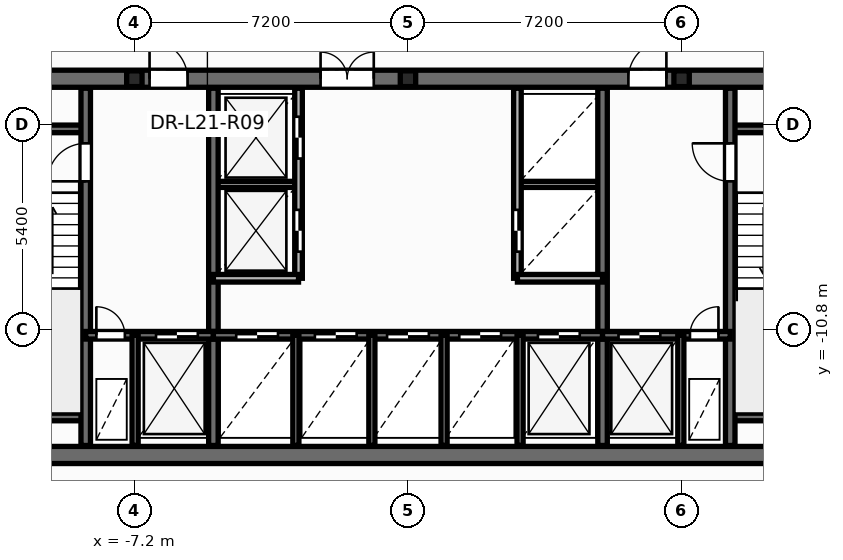
"""IFC4 building model, lengths in metres.
Left out: names, types, materials, properties, quantities, classifications, styles, units other than length and angle.
Written with IfcOpenShell. Run it as: python <this file> out.ifc"""

import sys

from ifc_helpers import new_model, si_unit, direction, frame, frame_2d, origin, origin_2d, place, context, subcontext, project, spatial, rectangle, i_section, extrude, element, fill, save


model = new_model("IFC4")
c1 = context("Model", 3, precision=1e-05, world=origin(), true_north=direction((0.0, 1.0)))
c2 = subcontext(c1, "Body", "Model", "MODEL_VIEW")
j1 = project(units=[si_unit("LENGTHUNIT", "METRE"), si_unit("PLANEANGLEUNIT", "RADIAN")], contexts=[c1])
p1 = place(None, origin())
s1 = spatial("IfcSite", under=j1, at=p1, CompositionType="ELEMENT")
p2 = place(p1, origin())
s2 = spatial("IfcBuilding", under=s1, at=p2, CompositionType="ELEMENT")
p3 = place(p2, frame((0.0, 0.0, 82.8)))
s3 = spatial("IfcBuildingStorey", under=s2, at=p3, CompositionType="ELEMENT", Elevation=82.8)
for number, where, z_axis, x_axis in (
    (1, (-7.2, -4.2, 0.0), (0.0, 0.0, 1.0), (1.0, 0.0, 0.0)),
    (2, (0.0, -4.2, 0.0), (0.0, 0.0, 1.0), (1.0, 0.0, 0.0)),
    (3, (7.2, -4.2, 0.0), (0.0, 0.0, 1.0), (1.0, 0.0, 0.0)),
):
    element("IfcColumn", number, at=place(p3, frame(where, z_axis=z_axis, x_axis=x_axis)), inside=s3, PredefinedType="PILASTER", context=c2, shape_type="SweptSolid", body=[
        extrude(i_section(OverallWidth=0.405, OverallDepth=0.414, WebThickness=0.022, FlangeThickness=0.032, at=origin_2d()), origin(), (0.0, 0.0, 1.0), 3.6),
    ])
for number, where, z_axis, x_axis in (
    (4, (-5.12, -6.98, 0.0), (0.0, 0.0, 1.0), (1.0, 0.0, 0.0)),
    (5, (2.88, -6.98, 0.0), (0.0, 0.0, 1.0), (1.0, 0.0, 0.0)),
):
    element("IfcWall", number, at=place(p3, frame(where, z_axis=z_axis, x_axis=x_axis)), inside=s3, PredefinedType="PARTITIONING", context=c2, shape_type="SweptSolid", body=[
        extrude(rectangle(XDim=2.24, YDim=0.16, at=frame_2d((1.12, 0.0))), origin(), (0.0, 0.0, 1.0), 3.35),
    ])
p4 = place(p3, frame((-12.65, -14.1, 0.0), z_axis=(0.0, 0.0, 1.0), x_axis=(1.0, 0.0, 0.0)))
e6 = element("IfcWall", 6, at=p4, inside=s3, PredefinedType="SHEAR", context=c2, shape_type="SweptSolid", body=[
    extrude(rectangle(XDim=25.3, YDim=0.45, at=frame_2d((12.65, 0.0))), origin(), (0.0, 0.0, 1.0), 3.6),
])
p5 = place(p3, frame((-12.65, -4.2, 0.0), z_axis=(0.0, 0.0, 1.0), x_axis=(1.0, 0.0, 0.0)))
e7 = element("IfcWall", 7, at=p5, inside=s3, PredefinedType="SHEAR", context=c2, shape_type="SweptSolid", body=[
    extrude(rectangle(XDim=25.3, YDim=0.45, at=frame_2d((12.65, 0.0))), origin(), (0.0, 0.0, 1.0), 3.6),
])
p6 = place(p5, frame((1.85, 0.0, 0.0)))
e8 = element("IfcOpeningElement", 8, at=p6, cuts=e7, PredefinedType="OPENING", context=c2, shape_type="SweptSolid", body=[
    extrude(rectangle(XDim=0.756, YDim=2.054, at=frame_2d((0.375, 1.027))), frame((0.0, 0.235, 0.0), z_axis=(0.0, -1.0, 0.0), x_axis=(1.0, 0.0, 0.0)), (0.0, 0.0, 1.0), 0.47),
])
p7 = place(p5, frame((22.65, 0.0, 0.0)))
e9 = element("IfcOpeningElement", 9, at=p7, cuts=e7, PredefinedType="OPENING", context=c2, shape_type="SweptSolid", body=[
    extrude(rectangle(XDim=0.756, YDim=2.054, at=frame_2d((0.375, 1.027))), frame((0.0, 0.235, 0.0), z_axis=(0.0, -1.0, 0.0), x_axis=(1.0, 0.0, 0.0)), (0.0, 0.0, 1.0), 0.47),
])
p8 = place(p5, frame((5.85, 0.0, 0.0)))
e10 = element("IfcOpeningElement", 10, at=p8, cuts=e7, PredefinedType="OPENING", context=c2, shape_type="SweptSolid", body=[
    extrude(rectangle(XDim=1.006, YDim=2.104, at=frame_2d((0.5, 1.052))), frame((0.0, 0.235, 0.0), z_axis=(0.0, -1.0, 0.0), x_axis=(1.0, 0.0, 0.0)), (0.0, 0.0, 1.0), 0.47),
])
p9 = place(p5, frame((10.35, 0.0, 0.0)))
e11 = element("IfcOpeningElement", 11, at=p9, cuts=e7, PredefinedType="OPENING", context=c2, shape_type="SweptSolid", body=[
    extrude(rectangle(XDim=1.406, YDim=2.154, at=frame_2d((0.7, 1.077))), frame((0.0, 0.235, 0.0), z_axis=(0.0, -1.0, 0.0), x_axis=(1.0, 0.0, 0.0)), (0.0, 0.0, 1.0), 0.47),
])
p10 = place(p5, frame((18.45, 0.0, 0.0)))
e12 = element("IfcOpeningElement", 12, at=p10, cuts=e7, PredefinedType="OPENING", context=c2, shape_type="SweptSolid", body=[
    extrude(rectangle(XDim=1.006, YDim=2.104, at=frame_2d((0.5, 1.052))), frame((0.0, 0.235, 0.0), z_axis=(0.0, -1.0, 0.0), x_axis=(1.0, 0.0, 0.0)), (0.0, 0.0, 1.0), 0.47),
])
for number, where, z_axis, x_axis in (
    (13, (-12.35, -5.52, 0.0), (0.0, 0.0, 1.0), (1.0, 0.0, 0.0)),
    (14, (-12.35, -13.1, 0.0), (0.0, 0.0, 1.0), (1.0, 0.0, 0.0)),
    (15, (8.48, -5.52, 0.0), (0.0, 0.0, 1.0), (1.0, 0.0, 0.0)),
    (16, (8.48, -13.1, 0.0), (0.0, 0.0, 1.0), (1.0, 0.0, 0.0)),
):
    element("IfcWall", number, at=place(p3, frame(where, z_axis=z_axis, x_axis=x_axis)), inside=s3, PredefinedType="SOLIDWALL", context=c2, shape_type="SweptSolid", body=[
        extrude(rectangle(XDim=3.87, YDim=0.2, at=frame_2d((1.935, 0.0))), origin(), (0.0, 0.0, 1.0), 3.6),
    ])
p11 = place(p3, frame((-8.48, -13.85, 0.0), z_axis=(0.0, 0.0, 1.0), x_axis=(0.0, 1.0, 0.0)))
e17 = element("IfcWall", 17, at=p11, inside=s3, PredefinedType="SHEAR", context=c2, shape_type="SweptSolid", body=[
    extrude(rectangle(XDim=9.4, YDim=0.25, at=frame_2d((4.7, 0.0))), origin(), (0.0, 0.0, 1.0), 3.6),
])
p12 = place(p11, frame((6.95, 0.0, 0.0)))
e18 = element("IfcOpeningElement", 18, at=p12, cuts=e17, PredefinedType="OPENING", context=c2, shape_type="SweptSolid", body=[
    extrude(rectangle(XDim=1.006, YDim=2.104, at=frame_2d((0.5, 1.052))), frame((0.0, 0.135, 0.0), z_axis=(0.0, -1.0, 0.0), x_axis=(1.0, 0.0, 0.0)), (0.0, 0.0, 1.0), 0.27),
])
p13 = place(p3, frame((8.48, -13.85, 0.0), z_axis=(0.0, 0.0, 1.0), x_axis=(0.0, 1.0, 0.0)))
e19 = element("IfcWall", 19, at=p13, inside=s3, PredefinedType="SHEAR", context=c2, shape_type="SweptSolid", body=[
    extrude(rectangle(XDim=9.4, YDim=0.25, at=frame_2d((4.7, 0.0))), origin(), (0.0, 0.0, 1.0), 3.6),
])
p14 = place(p13, frame((6.95, 0.0, 0.0)))
e20 = element("IfcOpeningElement", 20, at=p14, cuts=e19, PredefinedType="OPENING", context=c2, shape_type="SweptSolid", body=[
    extrude(rectangle(XDim=1.006, YDim=2.104, at=frame_2d((0.5, 1.052))), frame((0.0, 0.135, 0.0), z_axis=(0.0, -1.0, 0.0), x_axis=(1.0, 0.0, 0.0)), (0.0, 0.0, 1.0), 0.27),
])
for number, where, z_axis, x_axis in (
    (21, (-5.12, -13.85, 0.0), (0.0, 0.0, 1.0), (0.0, 1.0, 0.0)),
    (22, (5.12, -13.85, 0.0), (0.0, 0.0, 1.0), (0.0, 1.0, 0.0)),
):
    element("IfcWall", number, at=place(p3, frame(where, z_axis=z_axis, x_axis=x_axis)), inside=s3, PredefinedType="SHEAR", context=c2, shape_type="SweptSolid", body=[
        extrude(rectangle(XDim=9.4, YDim=0.25, at=frame_2d((4.7, 0.0))), origin(), (0.0, 0.0, 1.0), 3.6),
    ])
p15 = place(p3, frame((-8.48, -10.95, 0.0), z_axis=(0.0, 0.0, 1.0), x_axis=(1.0, 0.0, 0.0)))
e23 = element("IfcWall", 23, at=p15, inside=s3, PredefinedType="SOLIDWALL", context=c2, shape_type="SweptSolid", body=[
    extrude(rectangle(XDim=3.36, YDim=0.2, at=frame_2d((1.68, 0.0))), origin(), (0.0, 0.0, 1.0), 3.6),
])
p16 = place(p15, frame((0.28, 0.0, 0.0)))
e24 = element("IfcOpeningElement", 24, at=p16, cuts=e23, PredefinedType="OPENING", context=c2, shape_type="SweptSolid", body=[
    extrude(rectangle(XDim=0.756, YDim=2.054, at=frame_2d((0.375, 1.027))), frame((0.0, 0.11, 0.0), z_axis=(0.0, -1.0, 0.0), x_axis=(1.0, 0.0, 0.0)), (0.0, 0.0, 1.0), 0.22),
])
p17 = place(p15, frame((1.85, 0.0, 0.0)))
e25 = element("IfcOpeningElement", 25, at=p17, cuts=e23, PredefinedType="OPENING", context=c2, shape_type="SweptSolid", body=[
    extrude(rectangle(XDim=1.106, YDim=2.104, at=frame_2d((0.55, 1.052))), frame((0.0, 0.11, 0.0), z_axis=(0.0, -1.0, 0.0), x_axis=(1.0, 0.0, 0.0)), (0.0, 0.0, 1.0), 0.22),
])
p18 = place(p3, frame((-5.12, -10.95, 0.0), z_axis=(0.0, 0.0, 1.0), x_axis=(1.0, 0.0, 0.0)))
e26 = element("IfcWall", 26, at=p18, inside=s3, PredefinedType="SOLIDWALL", context=c2, shape_type="SweptSolid", body=[
    extrude(rectangle(XDim=10.24, YDim=0.2, at=frame_2d((5.12, 0.0))), origin(), (0.0, 0.0, 1.0), 3.6),
])
p19 = place(p18, frame((0.6, 0.0, 0.0)))
e27 = element("IfcOpeningElement", 27, at=p19, cuts=e26, PredefinedType="OPENING", context=c2, shape_type="SweptSolid", body=[
    extrude(rectangle(XDim=1.106, YDim=2.104, at=frame_2d((0.55, 1.052))), frame((0.0, 0.11, 0.0), z_axis=(0.0, -1.0, 0.0), x_axis=(1.0, 0.0, 0.0)), (0.0, 0.0, 1.0), 0.22),
])
p20 = place(p18, frame((2.67, 0.0, 0.0)))
e28 = element("IfcOpeningElement", 28, at=p20, cuts=e26, PredefinedType="OPENING", context=c2, shape_type="SweptSolid", body=[
    extrude(rectangle(XDim=1.106, YDim=2.104, at=frame_2d((0.55, 1.052))), frame((0.0, 0.11, 0.0), z_axis=(0.0, -1.0, 0.0), x_axis=(1.0, 0.0, 0.0)), (0.0, 0.0, 1.0), 0.22),
])
p21 = place(p18, frame((4.57, 0.0, 0.0)))
e29 = element("IfcOpeningElement", 29, at=p21, cuts=e26, PredefinedType="OPENING", context=c2, shape_type="SweptSolid", body=[
    extrude(rectangle(XDim=1.106, YDim=2.104, at=frame_2d((0.55, 1.052))), frame((0.0, 0.11, 0.0), z_axis=(0.0, -1.0, 0.0), x_axis=(1.0, 0.0, 0.0)), (0.0, 0.0, 1.0), 0.22),
])
p22 = place(p18, frame((6.47, 0.0, 0.0)))
e30 = element("IfcOpeningElement", 30, at=p22, cuts=e26, PredefinedType="OPENING", context=c2, shape_type="SweptSolid", body=[
    extrude(rectangle(XDim=1.106, YDim=2.104, at=frame_2d((0.55, 1.052))), frame((0.0, 0.11, 0.0), z_axis=(0.0, -1.0, 0.0), x_axis=(1.0, 0.0, 0.0)), (0.0, 0.0, 1.0), 0.22),
])
p23 = place(p18, frame((8.54, 0.0, 0.0)))
e31 = element("IfcOpeningElement", 31, at=p23, cuts=e26, PredefinedType="OPENING", context=c2, shape_type="SweptSolid", body=[
    extrude(rectangle(XDim=1.106, YDim=2.104, at=frame_2d((0.55, 1.052))), frame((0.0, 0.11, 0.0), z_axis=(0.0, -1.0, 0.0), x_axis=(1.0, 0.0, 0.0)), (0.0, 0.0, 1.0), 0.22),
])
p24 = place(p3, frame((5.12, -10.95, 0.0), z_axis=(0.0, 0.0, 1.0), x_axis=(1.0, 0.0, 0.0)))
e32 = element("IfcWall", 32, at=p24, inside=s3, PredefinedType="SOLIDWALL", context=c2, shape_type="SweptSolid", body=[
    extrude(rectangle(XDim=3.36, YDim=0.2, at=frame_2d((1.68, 0.0))), origin(), (0.0, 0.0, 1.0), 3.6),
])
p25 = place(p24, frame((0.42, 0.0, 0.0)))
e33 = element("IfcOpeningElement", 33, at=p25, cuts=e32, PredefinedType="OPENING", context=c2, shape_type="SweptSolid", body=[
    extrude(rectangle(XDim=1.106, YDim=2.104, at=frame_2d((0.55, 1.052))), frame((0.0, 0.11, 0.0), z_axis=(0.0, -1.0, 0.0), x_axis=(1.0, 0.0, 0.0)), (0.0, 0.0, 1.0), 0.22),
])
p26 = place(p24, frame((2.3, 0.0, 0.0)))
e34 = element("IfcOpeningElement", 34, at=p26, cuts=e32, PredefinedType="OPENING", context=c2, shape_type="SweptSolid", body=[
    extrude(rectangle(XDim=0.756, YDim=2.054, at=frame_2d((0.375, 1.027))), frame((0.0, 0.11, 0.0), z_axis=(0.0, -1.0, 0.0), x_axis=(1.0, 0.0, 0.0)), (0.0, 0.0, 1.0), 0.22),
])
for number, where, z_axis, x_axis in (
    (35, (-7.18, -13.85, 0.0), (0.0, 0.0, 1.0), (0.0, 1.0, 0.0)),
    (36, (7.18, -13.85, 0.0), (0.0, 0.0, 1.0), (0.0, 1.0, 0.0)),
    (37, (-2.95, -13.85, 0.0), (0.0, 0.0, 1.0), (0.0, 1.0, 0.0)),
    (38, (2.95, -13.85, 0.0), (0.0, 0.0, 1.0), (0.0, 1.0, 0.0)),
):
    element("IfcWall", number, at=place(p3, frame(where, z_axis=z_axis, x_axis=x_axis)), inside=s3, PredefinedType="PARTITIONING", context=c2, shape_type="SweptSolid", body=[
        extrude(rectangle(XDim=2.9, YDim=0.16, at=frame_2d((1.45, 0.0))), origin(), (0.0, 0.0, 1.0), 2.375),
    ])
p27 = place(p3, frame((-2.88, -9.45, 0.0), z_axis=(0.0, 0.0, 1.0), x_axis=(0.0, 1.0, 0.0)))
e39 = element("IfcWall", 39, at=p27, inside=s3, PredefinedType="SOLIDWALL", context=c2, shape_type="SweptSolid", body=[
    extrude(rectangle(XDim=5.0, YDim=0.2, at=frame_2d((2.5, 0.0))), origin(), (0.0, 0.0, 1.0), 3.35),
])
p28 = place(p27, frame((0.7, 0.0, 0.0)))
e40 = element("IfcOpeningElement", 40, at=p28, cuts=e39, PredefinedType="OPENING", context=c2, shape_type="SweptSolid", body=[
    extrude(rectangle(XDim=1.106, YDim=2.104, at=frame_2d((0.55, 1.052))), frame((0.0, 0.11, 0.0), z_axis=(0.0, -1.0, 0.0), x_axis=(1.0, 0.0, 0.0)), (0.0, 0.0, 1.0), 0.22),
])
p29 = place(p27, frame((3.15, 0.0, 0.0)))
e41 = element("IfcOpeningElement", 41, at=p29, cuts=e39, PredefinedType="OPENING", context=c2, shape_type="SweptSolid", body=[
    extrude(rectangle(XDim=1.106, YDim=2.104, at=frame_2d((0.55, 1.052))), frame((0.0, 0.11, 0.0), z_axis=(0.0, -1.0, 0.0), x_axis=(1.0, 0.0, 0.0)), (0.0, 0.0, 1.0), 0.22),
])
p30 = place(p3, frame((-5.12, -9.45, 0.0), z_axis=(0.0, 0.0, 1.0), x_axis=(1.0, 0.0, 0.0)))
e42 = element("IfcWall", 42, at=p30, inside=s3, PredefinedType="SOLIDWALL", context=c2, shape_type="SweptSolid", body=[
    extrude(rectangle(XDim=2.24, YDim=0.2, at=frame_2d((1.12, 0.0))), origin(), (0.0, 0.0, 1.0), 3.35),
])
p31 = place(p3, frame((2.88, -9.45, 0.0), z_axis=(0.0, 0.0, 1.0), x_axis=(0.0, 1.0, 0.0)))
e43 = element("IfcWall", 43, at=p31, inside=s3, PredefinedType="SOLIDWALL", context=c2, shape_type="SweptSolid", body=[
    extrude(rectangle(XDim=5.0, YDim=0.2, at=frame_2d((2.5, 0.0))), origin(), (0.0, 0.0, 1.0), 3.35),
])
p32 = place(p31, frame((0.7, 0.0, 0.0)))
e44 = element("IfcOpeningElement", 44, at=p32, cuts=e43, PredefinedType="OPENING", context=c2, shape_type="SweptSolid", body=[
    extrude(rectangle(XDim=1.106, YDim=2.104, at=frame_2d((0.55, 1.052))), frame((0.0, 0.11, 0.0), z_axis=(0.0, -1.0, 0.0), x_axis=(1.0, 0.0, 0.0)), (0.0, 0.0, 1.0), 0.22),
])
p33 = place(p3, frame((2.88, -9.45, 0.0), z_axis=(0.0, 0.0, 1.0), x_axis=(1.0, 0.0, 0.0)))
e45 = element("IfcWall", 45, at=p33, inside=s3, PredefinedType="SOLIDWALL", context=c2, shape_type="SweptSolid", body=[
    extrude(rectangle(XDim=2.24, YDim=0.2, at=frame_2d((1.12, 0.0))), origin(), (0.0, 0.0, 1.0), 3.35),
])
for number, where, z_axis, x_axis in (
    (46, (-0.95, -13.85, 0.0), (0.0, 0.0, 1.0), (0.0, 1.0, 0.0)),
    (47, (0.95, -13.85, 0.0), (0.0, 0.0, 1.0), (0.0, 1.0, 0.0)),
):
    element("IfcWall", number, at=place(p3, frame(where, z_axis=z_axis, x_axis=x_axis)), inside=s3, PredefinedType="PARTITIONING", context=c2, shape_type="SweptSolid", body=[
        extrude(rectangle(XDim=2.9, YDim=0.16, at=frame_2d((1.45, 0.0))), origin(), (0.0, 0.0, 1.0), 2.375),
    ])
p34 = place(p28, origin())
e48 = element("IfcDoor", 48, at=p34, inside=s3, OperationType="DOUBLE_DOOR_SLIDING", PredefinedType="DOOR", context=c2, shape_type="SweptSolid", body=[
    extrude(rectangle(XDim=1.1, YDim=2.1, at=frame_2d((0.55, 1.05))), frame((0.0, 0.025, 0.0), z_axis=(0.0, -1.0, 0.0), x_axis=(1.0, 0.0, 0.0)), (0.0, 0.0, 1.0), 0.05),
])
fill(e40, e48)
p35 = place(p29, origin())
e49 = element("IfcDoor", 49, at=p35, inside=s3, OperationType="DOUBLE_DOOR_SLIDING", PredefinedType="DOOR", context=c2, shape_type="SweptSolid", body=[
    extrude(rectangle(XDim=1.1, YDim=2.1, at=frame_2d((0.55, 1.05))), frame((0.0, 0.025, 0.0), z_axis=(0.0, -1.0, 0.0), x_axis=(1.0, 0.0, 0.0)), (0.0, 0.0, 1.0), 0.05),
])
fill(e41, e49)
p36 = place(p32, origin())
e50 = element("IfcDoor", 50, at=p36, inside=s3, OperationType="DOUBLE_DOOR_SLIDING", PredefinedType="DOOR", context=c2, shape_type="SweptSolid", body=[
    extrude(rectangle(XDim=1.1, YDim=2.1, at=frame_2d((0.55, 1.05))), frame((0.0, 0.025, 0.0), z_axis=(0.0, -1.0, 0.0), x_axis=(1.0, 0.0, 0.0)), (0.0, 0.0, 1.0), 0.05),
])
fill(e44, e50)
p37 = place(p12, origin())
e51 = element("IfcDoor", 51, at=p37, inside=s3, OperationType="SINGLE_SWING_LEFT", PredefinedType="DOOR", context=c2, shape_type="SweptSolid", body=[
    extrude(rectangle(XDim=1.0, YDim=2.1, at=frame_2d((0.5, 1.05))), frame((0.0, 0.025, 0.0), z_axis=(0.0, -1.0, 0.0), x_axis=(1.0, 0.0, 0.0)), (0.0, 0.0, 1.0), 0.05),
])
fill(e18, e51)
p38 = place(p14, origin())
e52 = element("IfcDoor", 52, at=p38, inside=s3, OperationType="SINGLE_SWING_RIGHT", PredefinedType="DOOR", context=c2, shape_type="SweptSolid", body=[
    extrude(rectangle(XDim=1.0, YDim=2.1, at=frame_2d((0.5, 1.05))), frame((0.0, 0.025, 0.0), z_axis=(0.0, -1.0, 0.0), x_axis=(1.0, 0.0, 0.0)), (0.0, 0.0, 1.0), 0.05),
])
fill(e20, e52)
p39 = place(p16, origin())
e53 = element("IfcDoor", 53, at=p39, inside=s3, OperationType="SINGLE_SWING_LEFT", PredefinedType="DOOR", context=c2, shape_type="SweptSolid", body=[
    extrude(rectangle(XDim=0.75, YDim=2.05, at=frame_2d((0.375, 1.025))), frame((0.0, 0.025, 0.0), z_axis=(0.0, -1.0, 0.0), x_axis=(1.0, 0.0, 0.0)), (0.0, 0.0, 1.0), 0.05),
])
fill(e24, e53)
p40 = place(p17, origin())
e54 = element("IfcDoor", 54, at=p40, inside=s3, OperationType="DOUBLE_DOOR_SLIDING", PredefinedType="DOOR", context=c2, shape_type="SweptSolid", body=[
    extrude(rectangle(XDim=1.1, YDim=2.1, at=frame_2d((0.55, 1.05))), frame((0.0, 0.025, 0.0), z_axis=(0.0, -1.0, 0.0), x_axis=(1.0, 0.0, 0.0)), (0.0, 0.0, 1.0), 0.05),
])
fill(e25, e54)
p41 = place(p25, origin())
e55 = element("IfcDoor", 55, at=p41, inside=s3, OperationType="DOUBLE_DOOR_SLIDING", PredefinedType="DOOR", context=c2, shape_type="SweptSolid", body=[
    extrude(rectangle(XDim=1.1, YDim=2.1, at=frame_2d((0.55, 1.05))), frame((0.0, 0.025, 0.0), z_axis=(0.0, -1.0, 0.0), x_axis=(1.0, 0.0, 0.0)), (0.0, 0.0, 1.0), 0.05),
])
fill(e33, e55)
p42 = place(p26, origin())
e56 = element("IfcDoor", 56, at=p42, inside=s3, OperationType="SINGLE_SWING_RIGHT", PredefinedType="DOOR", context=c2, shape_type="SweptSolid", body=[
    extrude(rectangle(XDim=0.75, YDim=2.05, at=frame_2d((0.375, 1.025))), frame((0.0, 0.025, 0.0), z_axis=(0.0, -1.0, 0.0), x_axis=(1.0, 0.0, 0.0)), (0.0, 0.0, 1.0), 0.05),
])
fill(e34, e56)
p43 = place(p19, origin())
e57 = element("IfcDoor", 57, at=p43, inside=s3, OperationType="DOUBLE_DOOR_SLIDING", PredefinedType="DOOR", context=c2, shape_type="SweptSolid", body=[
    extrude(rectangle(XDim=1.1, YDim=2.1, at=frame_2d((0.55, 1.05))), frame((0.0, 0.025, 0.0), z_axis=(0.0, -1.0, 0.0), x_axis=(1.0, 0.0, 0.0)), (0.0, 0.0, 1.0), 0.05),
])
fill(e27, e57)
p44 = place(p20, origin())
e58 = element("IfcDoor", 58, at=p44, inside=s3, OperationType="DOUBLE_DOOR_SLIDING", PredefinedType="DOOR", context=c2, shape_type="SweptSolid", body=[
    extrude(rectangle(XDim=1.1, YDim=2.1, at=frame_2d((0.55, 1.05))), frame((0.0, 0.025, 0.0), z_axis=(0.0, -1.0, 0.0), x_axis=(1.0, 0.0, 0.0)), (0.0, 0.0, 1.0), 0.05),
])
fill(e28, e58)
p45 = place(p21, origin())
e59 = element("IfcDoor", 59, at=p45, inside=s3, OperationType="DOUBLE_DOOR_SLIDING", PredefinedType="DOOR", context=c2, shape_type="SweptSolid", body=[
    extrude(rectangle(XDim=1.1, YDim=2.1, at=frame_2d((0.55, 1.05))), frame((0.0, 0.025, 0.0), z_axis=(0.0, -1.0, 0.0), x_axis=(1.0, 0.0, 0.0)), (0.0, 0.0, 1.0), 0.05),
])
fill(e29, e59)
p46 = place(p22, origin())
e60 = element("IfcDoor", 60, at=p46, inside=s3, OperationType="DOUBLE_DOOR_SLIDING", PredefinedType="DOOR", context=c2, shape_type="SweptSolid", body=[
    extrude(rectangle(XDim=1.1, YDim=2.1, at=frame_2d((0.55, 1.05))), frame((0.0, 0.025, 0.0), z_axis=(0.0, -1.0, 0.0), x_axis=(1.0, 0.0, 0.0)), (0.0, 0.0, 1.0), 0.05),
])
fill(e30, e60)
p47 = place(p23, origin())
e61 = element("IfcDoor", 61, at=p47, inside=s3, OperationType="DOUBLE_DOOR_SLIDING", PredefinedType="DOOR", context=c2, shape_type="SweptSolid", body=[
    extrude(rectangle(XDim=1.1, YDim=2.1, at=frame_2d((0.55, 1.05))), frame((0.0, 0.025, 0.0), z_axis=(0.0, -1.0, 0.0), x_axis=(1.0, 0.0, 0.0)), (0.0, 0.0, 1.0), 0.05),
])
fill(e31, e61)
p48 = place(p8, origin())
e62 = element("IfcDoor", 62, at=p48, inside=s3, OperationType="SINGLE_SWING_LEFT", PredefinedType="DOOR", context=c2, shape_type="SweptSolid", body=[
    extrude(rectangle(XDim=1.0, YDim=2.1, at=frame_2d((0.5, 1.05))), frame((0.0, 0.025, 0.0), z_axis=(0.0, -1.0, 0.0), x_axis=(1.0, 0.0, 0.0)), (0.0, 0.0, 1.0), 0.05),
])
fill(e10, e62)
p49 = place(p9, origin())
e63 = element("IfcDoor", 63, at=p49, inside=s3, OperationType="DOUBLE_DOOR_SINGLE_SWING", PredefinedType="DOOR", context=c2, shape_type="SweptSolid", body=[
    extrude(rectangle(XDim=1.4, YDim=2.15, at=frame_2d((0.7, 1.075))), frame((0.0, 0.025, 0.0), z_axis=(0.0, -1.0, 0.0), x_axis=(1.0, 0.0, 0.0)), (0.0, 0.0, 1.0), 0.05),
])
fill(e11, e63)
p50 = place(p10, origin())
e64 = element("IfcDoor", 64, at=p50, inside=s3, OperationType="SINGLE_SWING_RIGHT", PredefinedType="DOOR", context=c2, shape_type="SweptSolid", body=[
    extrude(rectangle(XDim=1.0, YDim=2.1, at=frame_2d((0.5, 1.05))), frame((0.0, 0.025, 0.0), z_axis=(0.0, -1.0, 0.0), x_axis=(1.0, 0.0, 0.0)), (0.0, 0.0, 1.0), 0.05),
])
fill(e12, e64)
save(model, sys.argv[1])
